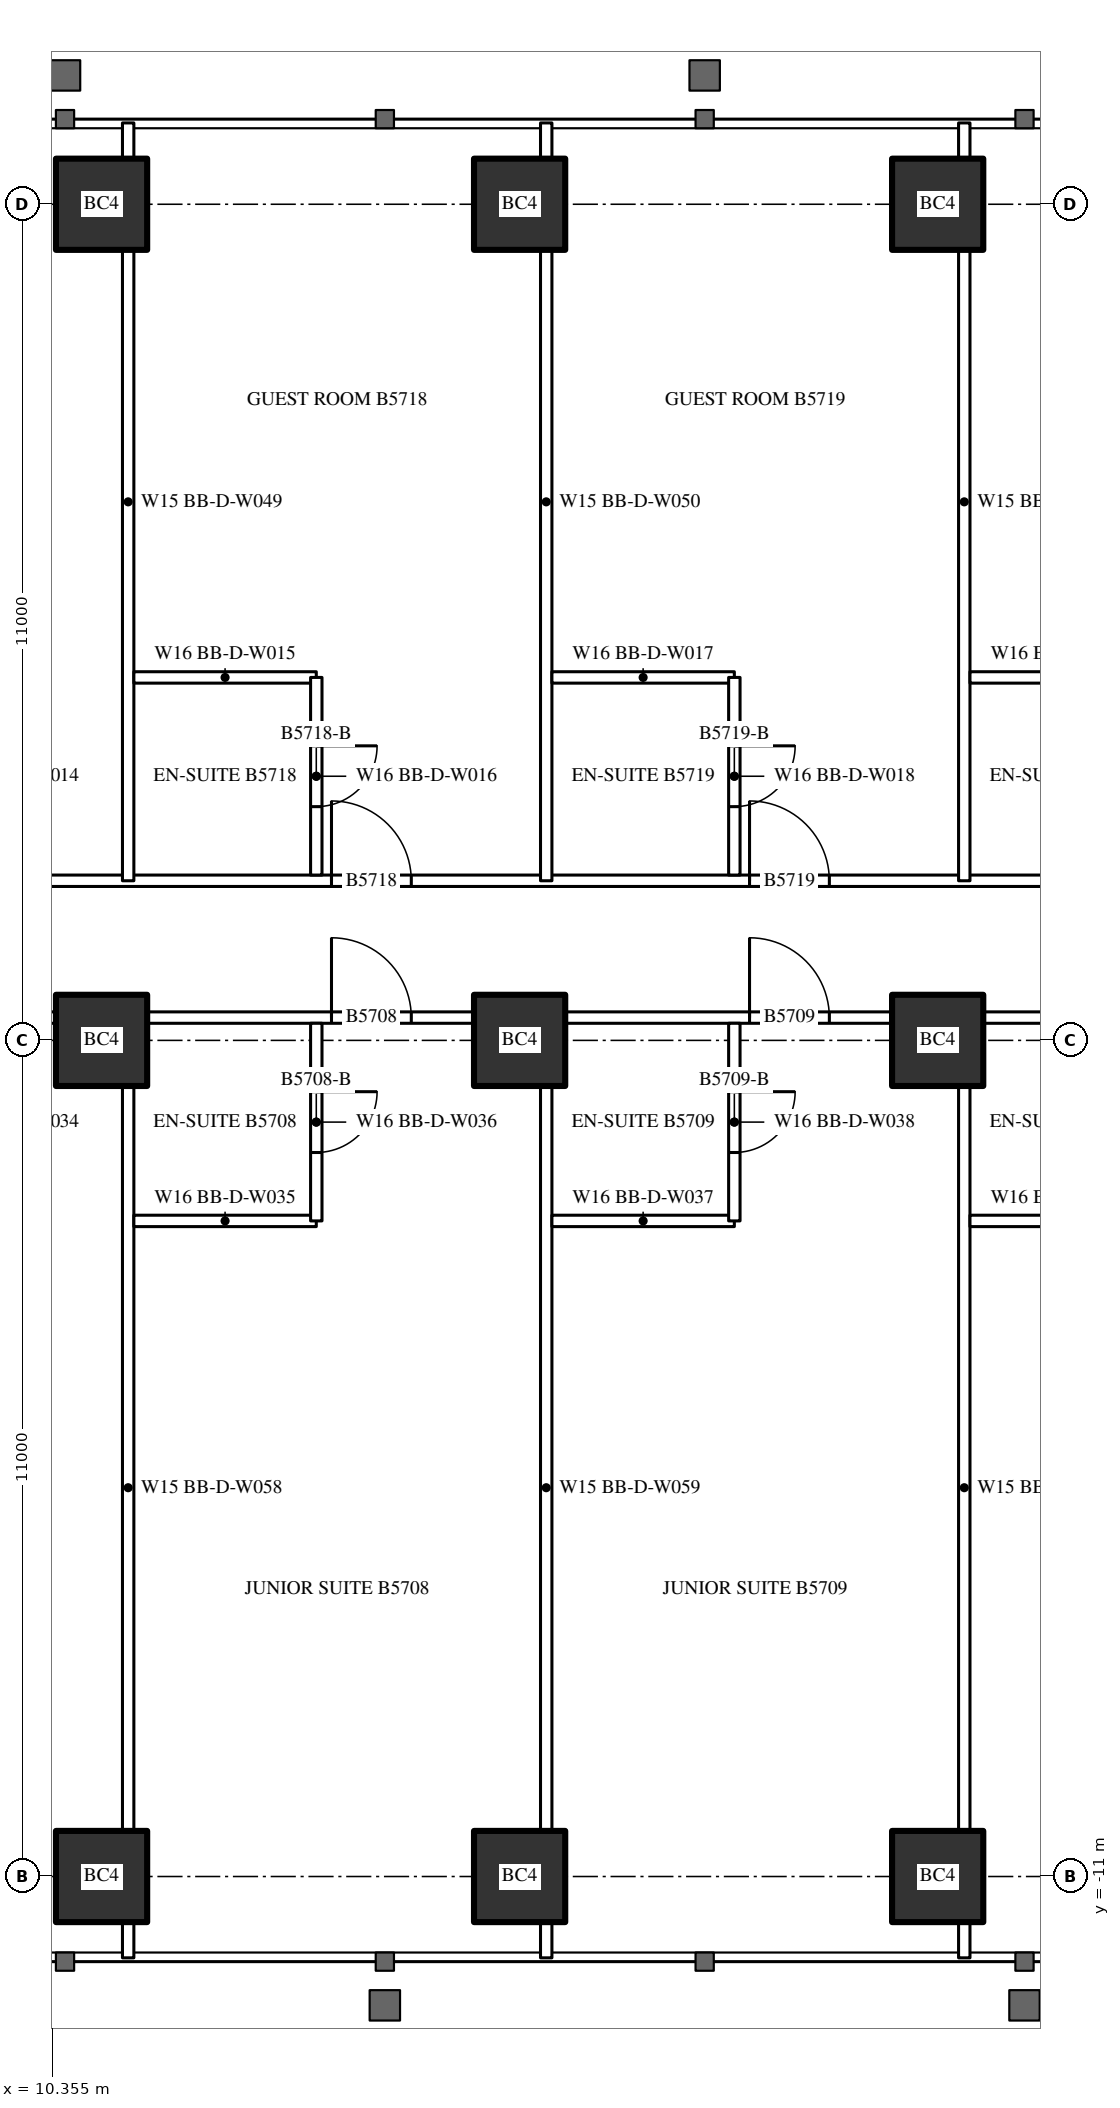
"""IFC4 building model, lengths in metres.
Left out: names, types, materials, properties, quantities, classifications, styles, units other than length and angle.
Written with IfcOpenShell. Run it as: python <this file> out.ifc"""

import sys

from ifc_helpers import new_model, si_unit, direction, frame, frame_2d, origin, origin_2d, place, context, subcontext, project, spatial, rectangle, hollow_rectangle, extrude, element, fill, save


model = new_model("IFC4")
c1 = context("Model", 3, precision=1e-05, world=origin(), true_north=direction((0.0, 1.0)))
c2 = subcontext(c1, "Body", "Model", "MODEL_VIEW")
j1 = project(units=[si_unit("LENGTHUNIT", "METRE"), si_unit("PLANEANGLEUNIT", "RADIAN")], contexts=[c1])
p1 = place(None, origin())
s1 = spatial("IfcSite", under=j1, at=p1, CompositionType="ELEMENT")
p2 = place(p1, origin())
s2 = spatial("IfcBuilding", under=s1, at=p2, CompositionType="ELEMENT")
p3 = place(p2, frame((0.0, 0.0, 215.3)))
s3 = spatial("IfcBuildingStorey", under=s2, at=p3, CompositionType="ELEMENT", Elevation=215.3)
for number, where, z_axis, x_axis in (
    (1, (11.0, -11.0, 0.0), (0.0, 0.0, 1.0), (1.0, 0.0, 0.0)),
    (2, (16.5, -11.0, 0.0), (0.0, 0.0, 1.0), (1.0, 0.0, 0.0)),
    (3, (22.0, -11.0, 0.0), (0.0, 0.0, 1.0), (1.0, 0.0, 0.0)),
    (4, (11.0, 0.0, 0.0), (0.0, 0.0, 1.0), (1.0, 0.0, 0.0)),
    (5, (16.5, 0.0, 0.0), (0.0, 0.0, 1.0), (1.0, 0.0, 0.0)),
    (6, (22.0, 0.0, 0.0), (0.0, 0.0, 1.0), (1.0, 0.0, 0.0)),
    (7, (11.0, 11.0, 0.0), (0.0, 0.0, 1.0), (1.0, 0.0, 0.0)),
    (8, (16.5, 11.0, 0.0), (0.0, 0.0, 1.0), (1.0, 0.0, 0.0)),
    (9, (22.0, 11.0, 0.0), (0.0, 0.0, 1.0), (1.0, 0.0, 0.0)),
):
    element("IfcColumn", number, at=place(p3, frame(where, z_axis=z_axis, x_axis=x_axis)), inside=s3, PredefinedType="COLUMN", context=c2, shape_type="SweptSolid", body=[
        extrude(hollow_rectangle(XDim=1.2, YDim=1.2, WallThickness=0.12, at=origin_2d()), origin(), (0.0, 0.0, 1.0), 3.6),
    ])
p4 = place(p3, frame((-27.5, 0.3, 0.0), z_axis=(0.0, 0.0, 1.0), x_axis=(1.0, 0.0, 0.0)))
e10 = element("IfcWall", 10, at=p4, inside=s3, PredefinedType="PARTITIONING", context=c2, shape_type="SweptSolid", body=[
    extrude(rectangle(XDim=55.0, YDim=0.15, at=frame_2d((27.5, 0.0))), origin(), (0.0, 0.0, 1.0), 2.4),
])
p5 = place(p4, frame((1.575, 0.0, 0.0)))
e11 = element("IfcOpeningElement", 11, at=p5, cuts=e10, PredefinedType="OPENING", context=c2, shape_type="SweptSolid", body=[
    extrude(rectangle(XDim=1.0, YDim=2.2, at=frame_2d((0.5, 1.1))), frame((0.0, 0.085, 0.0), z_axis=(0.0, -1.0, 0.0), x_axis=(1.0, 0.0, 0.0)), (0.0, 0.0, 1.0), 0.17),
])
p6 = place(p4, frame((8.525, 0.0, 0.0)))
e12 = element("IfcOpeningElement", 12, at=p6, cuts=e10, PredefinedType="OPENING", context=c2, shape_type="SweptSolid", body=[
    extrude(rectangle(XDim=1.05, YDim=2.4, at=frame_2d((0.525, 1.2))), frame((0.0, 0.085, 0.0), z_axis=(0.0, -1.0, 0.0), x_axis=(1.0, 0.0, 0.0)), (0.0, 0.0, 1.0), 0.17),
])
p7 = place(p4, frame((14.025, 0.0, 0.0)))
e13 = element("IfcOpeningElement", 13, at=p7, cuts=e10, PredefinedType="OPENING", context=c2, shape_type="SweptSolid", body=[
    extrude(rectangle(XDim=1.05, YDim=2.4, at=frame_2d((0.525, 1.2))), frame((0.0, 0.085, 0.0), z_axis=(0.0, -1.0, 0.0), x_axis=(1.0, 0.0, 0.0)), (0.0, 0.0, 1.0), 0.17),
])
p8 = place(p4, frame((19.525, 0.0, 0.0)))
e14 = element("IfcOpeningElement", 14, at=p8, cuts=e10, PredefinedType="OPENING", context=c2, shape_type="SweptSolid", body=[
    extrude(rectangle(XDim=1.05, YDim=2.4, at=frame_2d((0.525, 1.2))), frame((0.0, 0.085, 0.0), z_axis=(0.0, -1.0, 0.0), x_axis=(1.0, 0.0, 0.0)), (0.0, 0.0, 1.0), 0.17),
])
p9 = place(p4, frame((25.025, 0.0, 0.0)))
e15 = element("IfcOpeningElement", 15, at=p9, cuts=e10, PredefinedType="OPENING", context=c2, shape_type="SweptSolid", body=[
    extrude(rectangle(XDim=1.05, YDim=2.4, at=frame_2d((0.525, 1.2))), frame((0.0, 0.085, 0.0), z_axis=(0.0, -1.0, 0.0), x_axis=(1.0, 0.0, 0.0)), (0.0, 0.0, 1.0), 0.17),
])
p10 = place(p4, frame((30.525, 0.0, 0.0)))
e16 = element("IfcOpeningElement", 16, at=p10, cuts=e10, PredefinedType="OPENING", context=c2, shape_type="SweptSolid", body=[
    extrude(rectangle(XDim=1.05, YDim=2.4, at=frame_2d((0.525, 1.2))), frame((0.0, 0.085, 0.0), z_axis=(0.0, -1.0, 0.0), x_axis=(1.0, 0.0, 0.0)), (0.0, 0.0, 1.0), 0.17),
])
p11 = place(p4, frame((36.025, 0.0, 0.0)))
e17 = element("IfcOpeningElement", 17, at=p11, cuts=e10, PredefinedType="OPENING", context=c2, shape_type="SweptSolid", body=[
    extrude(rectangle(XDim=1.05, YDim=2.4, at=frame_2d((0.525, 1.2))), frame((0.0, 0.085, 0.0), z_axis=(0.0, -1.0, 0.0), x_axis=(1.0, 0.0, 0.0)), (0.0, 0.0, 1.0), 0.17),
])
p12 = place(p4, frame((41.525, 0.0, 0.0)))
e18 = element("IfcOpeningElement", 18, at=p12, cuts=e10, PredefinedType="OPENING", context=c2, shape_type="SweptSolid", body=[
    extrude(rectangle(XDim=1.05, YDim=2.4, at=frame_2d((0.525, 1.2))), frame((0.0, 0.085, 0.0), z_axis=(0.0, -1.0, 0.0), x_axis=(1.0, 0.0, 0.0)), (0.0, 0.0, 1.0), 0.17),
])
p13 = place(p4, frame((47.025, 0.0, 0.0)))
e19 = element("IfcOpeningElement", 19, at=p13, cuts=e10, PredefinedType="OPENING", context=c2, shape_type="SweptSolid", body=[
    extrude(rectangle(XDim=1.05, YDim=2.4, at=frame_2d((0.525, 1.2))), frame((0.0, 0.085, 0.0), z_axis=(0.0, -1.0, 0.0), x_axis=(1.0, 0.0, 0.0)), (0.0, 0.0, 1.0), 0.17),
])
p14 = place(p4, frame((52.525, 0.0, 0.0)))
e20 = element("IfcOpeningElement", 20, at=p14, cuts=e10, PredefinedType="OPENING", context=c2, shape_type="SweptSolid", body=[
    extrude(rectangle(XDim=1.05, YDim=2.4, at=frame_2d((0.525, 1.2))), frame((0.0, 0.085, 0.0), z_axis=(0.0, -1.0, 0.0), x_axis=(1.0, 0.0, 0.0)), (0.0, 0.0, 1.0), 0.17),
])
p15 = place(p3, frame((-27.5, 2.1, 0.0), z_axis=(0.0, 0.0, 1.0), x_axis=(1.0, 0.0, 0.0)))
e21 = element("IfcWall", 21, at=p15, inside=s3, PredefinedType="PARTITIONING", context=c2, shape_type="SweptSolid", body=[
    extrude(rectangle(XDim=55.0, YDim=0.15, at=frame_2d((27.5, 0.0))), origin(), (0.0, 0.0, 1.0), 3.4),
])
p16 = place(p15, frame((2.025, 0.0, 0.0)))
e22 = element("IfcOpeningElement", 22, at=p16, cuts=e21, PredefinedType="OPENING", context=c2, shape_type="SweptSolid", body=[
    extrude(rectangle(XDim=1.05, YDim=2.4, at=frame_2d((0.525, 1.2))), frame((0.0, 0.085, 0.0), z_axis=(0.0, -1.0, 0.0), x_axis=(1.0, 0.0, 0.0)), (0.0, 0.0, 1.0), 0.17),
])
p17 = place(p15, frame((8.525, 0.0, 0.0)))
e23 = element("IfcOpeningElement", 23, at=p17, cuts=e21, PredefinedType="OPENING", context=c2, shape_type="SweptSolid", body=[
    extrude(rectangle(XDim=1.05, YDim=2.4, at=frame_2d((0.525, 1.2))), frame((0.0, 0.085, 0.0), z_axis=(0.0, -1.0, 0.0), x_axis=(1.0, 0.0, 0.0)), (0.0, 0.0, 1.0), 0.17),
])
p18 = place(p15, frame((14.025, 0.0, 0.0)))
e24 = element("IfcOpeningElement", 24, at=p18, cuts=e21, PredefinedType="OPENING", context=c2, shape_type="SweptSolid", body=[
    extrude(rectangle(XDim=1.05, YDim=2.4, at=frame_2d((0.525, 1.2))), frame((0.0, 0.085, 0.0), z_axis=(0.0, -1.0, 0.0), x_axis=(1.0, 0.0, 0.0)), (0.0, 0.0, 1.0), 0.17),
])
p19 = place(p15, frame((19.525, 0.0, 0.0)))
e25 = element("IfcOpeningElement", 25, at=p19, cuts=e21, PredefinedType="OPENING", context=c2, shape_type="SweptSolid", body=[
    extrude(rectangle(XDim=1.05, YDim=2.4, at=frame_2d((0.525, 1.2))), frame((0.0, 0.085, 0.0), z_axis=(0.0, -1.0, 0.0), x_axis=(1.0, 0.0, 0.0)), (0.0, 0.0, 1.0), 0.17),
])
p20 = place(p15, frame((25.025, 0.0, 0.0)))
e26 = element("IfcOpeningElement", 26, at=p20, cuts=e21, PredefinedType="OPENING", context=c2, shape_type="SweptSolid", body=[
    extrude(rectangle(XDim=1.05, YDim=2.4, at=frame_2d((0.525, 1.2))), frame((0.0, 0.085, 0.0), z_axis=(0.0, -1.0, 0.0), x_axis=(1.0, 0.0, 0.0)), (0.0, 0.0, 1.0), 0.17),
])
p21 = place(p15, frame((30.525, 0.0, 0.0)))
e27 = element("IfcOpeningElement", 27, at=p21, cuts=e21, PredefinedType="OPENING", context=c2, shape_type="SweptSolid", body=[
    extrude(rectangle(XDim=1.05, YDim=2.4, at=frame_2d((0.525, 1.2))), frame((0.0, 0.085, 0.0), z_axis=(0.0, -1.0, 0.0), x_axis=(1.0, 0.0, 0.0)), (0.0, 0.0, 1.0), 0.17),
])
p22 = place(p15, frame((36.025, 0.0, 0.0)))
e28 = element("IfcOpeningElement", 28, at=p22, cuts=e21, PredefinedType="OPENING", context=c2, shape_type="SweptSolid", body=[
    extrude(rectangle(XDim=1.05, YDim=2.4, at=frame_2d((0.525, 1.2))), frame((0.0, 0.085, 0.0), z_axis=(0.0, -1.0, 0.0), x_axis=(1.0, 0.0, 0.0)), (0.0, 0.0, 1.0), 0.17),
])
p23 = place(p15, frame((41.525, 0.0, 0.0)))
e29 = element("IfcOpeningElement", 29, at=p23, cuts=e21, PredefinedType="OPENING", context=c2, shape_type="SweptSolid", body=[
    extrude(rectangle(XDim=1.05, YDim=2.4, at=frame_2d((0.525, 1.2))), frame((0.0, 0.085, 0.0), z_axis=(0.0, -1.0, 0.0), x_axis=(1.0, 0.0, 0.0)), (0.0, 0.0, 1.0), 0.17),
])
p24 = place(p15, frame((47.025, 0.0, 0.0)))
e30 = element("IfcOpeningElement", 30, at=p24, cuts=e21, PredefinedType="OPENING", context=c2, shape_type="SweptSolid", body=[
    extrude(rectangle(XDim=1.05, YDim=2.4, at=frame_2d((0.525, 1.2))), frame((0.0, 0.085, 0.0), z_axis=(0.0, -1.0, 0.0), x_axis=(1.0, 0.0, 0.0)), (0.0, 0.0, 1.0), 0.17),
])
p25 = place(p15, frame((52.525, 0.0, 0.0)))
e31 = element("IfcOpeningElement", 31, at=p25, cuts=e21, PredefinedType="OPENING", context=c2, shape_type="SweptSolid", body=[
    extrude(rectangle(XDim=1.05, YDim=2.4, at=frame_2d((0.525, 1.2))), frame((0.0, 0.085, 0.0), z_axis=(0.0, -1.0, 0.0), x_axis=(1.0, 0.0, 0.0)), (0.0, 0.0, 1.0), 0.17),
])
for number, where, z_axis, x_axis in (
    (32, (11.35, -12.07, 0.0), (0.0, 0.0, 1.0), (0.0, 1.0, 0.0)),
    (33, (16.85, -12.07, 0.0), (0.0, 0.0, 1.0), (0.0, 1.0, 0.0)),
    (34, (22.35, -12.07, 0.0), (0.0, 0.0, 1.0), (0.0, 1.0, 0.0)),
):
    element("IfcWall", number, at=place(p3, frame(where, z_axis=z_axis, x_axis=x_axis)), inside=s3, PredefinedType="PARTITIONING", context=c2, shape_type="SweptSolid", body=[
        extrude(rectangle(XDim=12.37, YDim=0.15, at=frame_2d((6.185, 0.0))), origin(), (0.0, 0.0, 1.0), 3.4),
    ])
p26 = place(p3, frame((11.425, -2.375, 0.0), z_axis=(0.0, 0.0, 1.0), x_axis=(1.0, 0.0, 0.0)))
e35 = element("IfcWall", 35, at=p26, inside=s3, PredefinedType="PARTITIONING", context=c2, shape_type="SweptSolid", body=[
    extrude(rectangle(XDim=2.4, YDim=0.15, at=frame_2d((1.2, 0.0))), origin(), (0.0, 0.0, 1.0), 3.4),
])
p27 = place(p3, frame((13.825, -2.375, 0.0), z_axis=(0.0, 0.0, 1.0), x_axis=(0.0, 1.0, 0.0)))
e36 = element("IfcWall", 36, at=p27, inside=s3, PredefinedType="PARTITIONING", context=c2, shape_type="SweptSolid", body=[
    extrude(rectangle(XDim=2.6, YDim=0.15, at=frame_2d((1.3, 0.0))), origin(), (0.0, 0.0, 1.0), 3.4),
])
p28 = place(p27, frame((0.9, 0.0, 0.0)))
e37 = element("IfcOpeningElement", 37, at=p28, cuts=e36, PredefinedType="OPENING", context=c2, shape_type="SweptSolid", body=[
    extrude(rectangle(XDim=0.8, YDim=2.2, at=frame_2d((0.4, 1.1))), frame((0.0, 0.085, 0.0), z_axis=(0.0, -1.0, 0.0), x_axis=(1.0, 0.0, 0.0)), (0.0, 0.0, 1.0), 0.17),
])
p29 = place(p3, frame((16.925, -2.375, 0.0), z_axis=(0.0, 0.0, 1.0), x_axis=(1.0, 0.0, 0.0)))
e38 = element("IfcWall", 38, at=p29, inside=s3, PredefinedType="PARTITIONING", context=c2, shape_type="SweptSolid", body=[
    extrude(rectangle(XDim=2.4, YDim=0.15, at=frame_2d((1.2, 0.0))), origin(), (0.0, 0.0, 1.0), 3.4),
])
p30 = place(p3, frame((19.325, -2.375, 0.0), z_axis=(0.0, 0.0, 1.0), x_axis=(0.0, 1.0, 0.0)))
e39 = element("IfcWall", 39, at=p30, inside=s3, PredefinedType="PARTITIONING", context=c2, shape_type="SweptSolid", body=[
    extrude(rectangle(XDim=2.6, YDim=0.15, at=frame_2d((1.3, 0.0))), origin(), (0.0, 0.0, 1.0), 3.4),
])
p31 = place(p30, frame((0.9, 0.0, 0.0)))
e40 = element("IfcOpeningElement", 40, at=p31, cuts=e39, PredefinedType="OPENING", context=c2, shape_type="SweptSolid", body=[
    extrude(rectangle(XDim=0.8, YDim=2.2, at=frame_2d((0.4, 1.1))), frame((0.0, 0.085, 0.0), z_axis=(0.0, -1.0, 0.0), x_axis=(1.0, 0.0, 0.0)), (0.0, 0.0, 1.0), 0.17),
])
p32 = place(p3, frame((22.425, -2.375, 0.0), z_axis=(0.0, 0.0, 1.0), x_axis=(1.0, 0.0, 0.0)))
e41 = element("IfcWall", 41, at=p32, inside=s3, PredefinedType="PARTITIONING", context=c2, shape_type="SweptSolid", body=[
    extrude(rectangle(XDim=2.4, YDim=0.15, at=frame_2d((1.2, 0.0))), origin(), (0.0, 0.0, 1.0), 3.4),
])
for number, where, z_axis, x_axis in (
    (42, (11.35, 2.1, 0.0), (0.0, 0.0, 1.0), (0.0, 1.0, 0.0)),
    (43, (16.85, 2.1, 0.0), (0.0, 0.0, 1.0), (0.0, 1.0, 0.0)),
    (44, (22.35, 2.1, 0.0), (0.0, 0.0, 1.0), (0.0, 1.0, 0.0)),
):
    element("IfcWall", number, at=place(p3, frame(where, z_axis=z_axis, x_axis=x_axis)), inside=s3, PredefinedType="PARTITIONING", context=c2, shape_type="SweptSolid", body=[
        extrude(rectangle(XDim=9.97, YDim=0.15, at=frame_2d((4.985, 0.0))), origin(), (0.0, 0.0, 1.0), 3.4),
    ])
p33 = place(p3, frame((11.425, 4.775, 0.0), z_axis=(0.0, 0.0, 1.0), x_axis=(1.0, 0.0, 0.0)))
e45 = element("IfcWall", 45, at=p33, inside=s3, PredefinedType="PARTITIONING", context=c2, shape_type="SweptSolid", body=[
    extrude(rectangle(XDim=2.4, YDim=0.15, at=frame_2d((1.2, 0.0))), origin(), (0.0, 0.0, 1.0), 3.4),
])
p34 = place(p3, frame((13.825, 2.175, 0.0), z_axis=(0.0, 0.0, 1.0), x_axis=(0.0, 1.0, 0.0)))
e46 = element("IfcWall", 46, at=p34, inside=s3, PredefinedType="PARTITIONING", context=c2, shape_type="SweptSolid", body=[
    extrude(rectangle(XDim=2.6, YDim=0.15, at=frame_2d((1.3, 0.0))), origin(), (0.0, 0.0, 1.0), 3.4),
])
p35 = place(p34, frame((0.9, 0.0, 0.0)))
e47 = element("IfcOpeningElement", 47, at=p35, cuts=e46, PredefinedType="OPENING", context=c2, shape_type="SweptSolid", body=[
    extrude(rectangle(XDim=0.8, YDim=2.2, at=frame_2d((0.4, 1.1))), frame((0.0, 0.085, 0.0), z_axis=(0.0, -1.0, 0.0), x_axis=(1.0, 0.0, 0.0)), (0.0, 0.0, 1.0), 0.17),
])
p36 = place(p3, frame((16.925, 4.775, 0.0), z_axis=(0.0, 0.0, 1.0), x_axis=(1.0, 0.0, 0.0)))
e48 = element("IfcWall", 48, at=p36, inside=s3, PredefinedType="PARTITIONING", context=c2, shape_type="SweptSolid", body=[
    extrude(rectangle(XDim=2.4, YDim=0.15, at=frame_2d((1.2, 0.0))), origin(), (0.0, 0.0, 1.0), 3.4),
])
p37 = place(p3, frame((19.325, 2.175, 0.0), z_axis=(0.0, 0.0, 1.0), x_axis=(0.0, 1.0, 0.0)))
e49 = element("IfcWall", 49, at=p37, inside=s3, PredefinedType="PARTITIONING", context=c2, shape_type="SweptSolid", body=[
    extrude(rectangle(XDim=2.6, YDim=0.15, at=frame_2d((1.3, 0.0))), origin(), (0.0, 0.0, 1.0), 3.4),
])
p38 = place(p37, frame((0.9, 0.0, 0.0)))
e50 = element("IfcOpeningElement", 50, at=p38, cuts=e49, PredefinedType="OPENING", context=c2, shape_type="SweptSolid", body=[
    extrude(rectangle(XDim=0.8, YDim=2.2, at=frame_2d((0.4, 1.1))), frame((0.0, 0.085, 0.0), z_axis=(0.0, -1.0, 0.0), x_axis=(1.0, 0.0, 0.0)), (0.0, 0.0, 1.0), 0.17),
])
p39 = place(p3, frame((22.425, 4.775, 0.0), z_axis=(0.0, 0.0, 1.0), x_axis=(1.0, 0.0, 0.0)))
e51 = element("IfcWall", 51, at=p39, inside=s3, PredefinedType="PARTITIONING", context=c2, shape_type="SweptSolid", body=[
    extrude(rectangle(XDim=2.4, YDim=0.15, at=frame_2d((1.2, 0.0))), origin(), (0.0, 0.0, 1.0), 3.4),
])
p40 = place(p28, origin())
e52 = element("IfcDoor", 52, at=p40, inside=s3, OperationType="SINGLE_SWING_RIGHT", PredefinedType="DOOR", context=c2, shape_type="SweptSolid", body=[
    extrude(rectangle(XDim=0.8, YDim=2.2, at=frame_2d((0.4, 1.1))), frame((0.0, 0.025, 0.0), z_axis=(0.0, -1.0, 0.0), x_axis=(1.0, 0.0, 0.0)), (0.0, 0.0, 1.0), 0.05),
])
fill(e37, e52)
p41 = place(p12, origin())
e53 = element("IfcDoor", 53, at=p41, inside=s3, OperationType="SINGLE_SWING_LEFT", PredefinedType="DOOR", context=c2, shape_type="SweptSolid", body=[
    extrude(rectangle(XDim=1.05, YDim=2.4, at=frame_2d((0.525, 1.2))), frame((0.0, 0.025, 0.0), z_axis=(0.0, -1.0, 0.0), x_axis=(1.0, 0.0, 0.0)), (0.0, 0.0, 1.0), 0.05),
])
fill(e18, e53)
p42 = place(p31, origin())
e54 = element("IfcDoor", 54, at=p42, inside=s3, OperationType="SINGLE_SWING_RIGHT", PredefinedType="DOOR", context=c2, shape_type="SweptSolid", body=[
    extrude(rectangle(XDim=0.8, YDim=2.2, at=frame_2d((0.4, 1.1))), frame((0.0, 0.025, 0.0), z_axis=(0.0, -1.0, 0.0), x_axis=(1.0, 0.0, 0.0)), (0.0, 0.0, 1.0), 0.05),
])
fill(e40, e54)
p43 = place(p13, origin())
e55 = element("IfcDoor", 55, at=p43, inside=s3, OperationType="SINGLE_SWING_LEFT", PredefinedType="DOOR", context=c2, shape_type="SweptSolid", body=[
    extrude(rectangle(XDim=1.05, YDim=2.4, at=frame_2d((0.525, 1.2))), frame((0.0, 0.025, 0.0), z_axis=(0.0, -1.0, 0.0), x_axis=(1.0, 0.0, 0.0)), (0.0, 0.0, 1.0), 0.05),
])
fill(e19, e55)
p44 = place(p35, origin())
e56 = element("IfcDoor", 56, at=p44, inside=s3, OperationType="SINGLE_SWING_RIGHT", PredefinedType="DOOR", context=c2, shape_type="SweptSolid", body=[
    extrude(rectangle(XDim=0.8, YDim=2.2, at=frame_2d((0.4, 1.1))), frame((0.0, 0.025, 0.0), z_axis=(0.0, -1.0, 0.0), x_axis=(1.0, 0.0, 0.0)), (0.0, 0.0, 1.0), 0.05),
])
fill(e47, e56)
p45 = place(p23, origin())
e57 = element("IfcDoor", 57, at=p45, inside=s3, OperationType="SINGLE_SWING_LEFT", PredefinedType="DOOR", context=c2, shape_type="SweptSolid", body=[
    extrude(rectangle(XDim=1.05, YDim=2.4, at=frame_2d((0.525, 1.2))), frame((0.0, 0.025, 0.0), z_axis=(0.0, -1.0, 0.0), x_axis=(1.0, 0.0, 0.0)), (0.0, 0.0, 1.0), 0.05),
])
fill(e29, e57)
p46 = place(p38, origin())
e58 = element("IfcDoor", 58, at=p46, inside=s3, OperationType="SINGLE_SWING_RIGHT", PredefinedType="DOOR", context=c2, shape_type="SweptSolid", body=[
    extrude(rectangle(XDim=0.8, YDim=2.2, at=frame_2d((0.4, 1.1))), frame((0.0, 0.025, 0.0), z_axis=(0.0, -1.0, 0.0), x_axis=(1.0, 0.0, 0.0)), (0.0, 0.0, 1.0), 0.05),
])
fill(e50, e58)
p47 = place(p24, origin())
e59 = element("IfcDoor", 59, at=p47, inside=s3, OperationType="SINGLE_SWING_LEFT", PredefinedType="DOOR", context=c2, shape_type="SweptSolid", body=[
    extrude(rectangle(XDim=1.05, YDim=2.4, at=frame_2d((0.525, 1.2))), frame((0.0, 0.025, 0.0), z_axis=(0.0, -1.0, 0.0), x_axis=(1.0, 0.0, 0.0)), (0.0, 0.0, 1.0), 0.05),
])
fill(e30, e59)
save(model, sys.argv[1])
